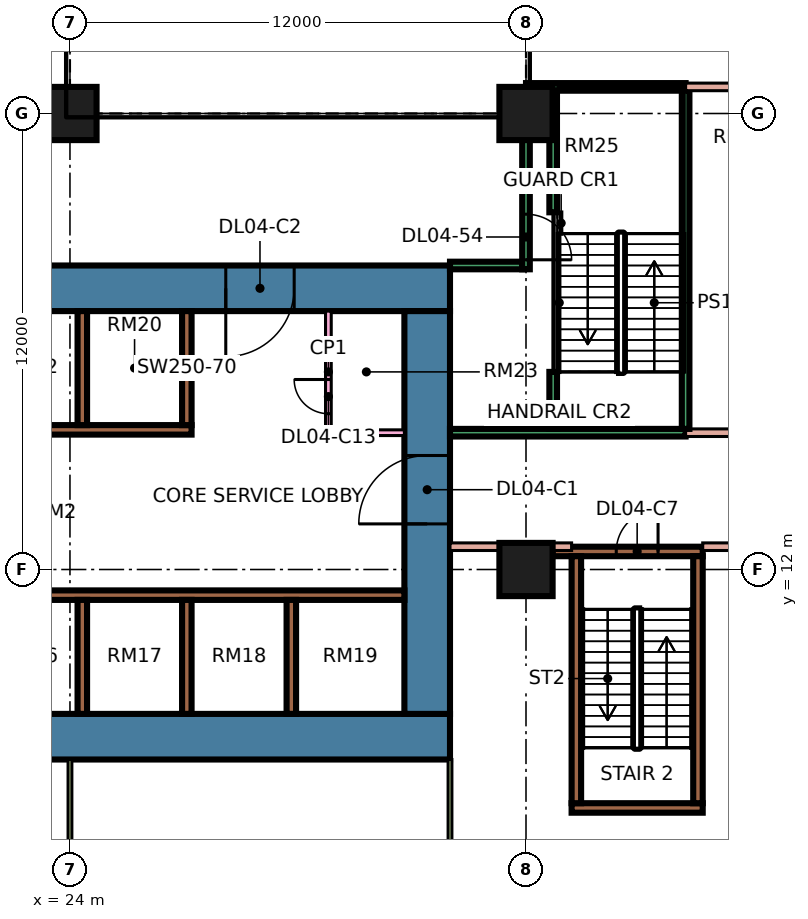
"""IFC4 building model, lengths in metres.
Left out: names, types, materials, properties, quantities, classifications, styles, units other than length and angle.
Written with IfcOpenShell. Run it as: python <this file> out.ifc"""

import sys

from ifc_helpers import new_model, si_unit, direction, frame, frame_2d, origin, origin_2d, place, context, subcontext, project, spatial, rectangle, extrude, element, fill, save


model = new_model("IFC4")
c1 = context("Model", 3, precision=1e-05, world=origin(), true_north=direction((0.0, 1.0)))
c2 = subcontext(c1, "Body", "Model", "MODEL_VIEW")
j1 = project(units=[si_unit("LENGTHUNIT", "METRE"), si_unit("PLANEANGLEUNIT", "RADIAN")], contexts=[c1])
p1 = place(None, origin())
s1 = spatial("IfcSite", under=j1, at=p1, CompositionType="ELEMENT")
p2 = place(p1, origin())
s2 = spatial("IfcBuilding", under=s1, at=p2, CompositionType="ELEMENT")
p3 = place(p2, frame((0.0, 0.0, 21.6)))
s3 = spatial("IfcBuildingStorey", under=s2, at=p3, CompositionType="ELEMENT", Elevation=21.6)
for number, where, z_axis, x_axis in (
    (1, (36.0, 12.0, 0.0), (0.0, 0.0, 1.0), (1.0, 0.0, 0.0)),
    (2, (24.0, 24.0, 0.0), (0.0, 0.0, 1.0), (1.0, 0.0, 0.0)),
    (3, (36.0, 24.0, 0.0), (0.0, 0.0, 1.0), (1.0, 0.0, 0.0)),
):
    element("IfcColumn", number, at=place(p3, frame(where, z_axis=z_axis, x_axis=x_axis)), inside=s3, PredefinedType="COLUMN", context=c2, shape_type="SweptSolid", body=[
        extrude(rectangle(XDim=1.4, YDim=1.4, at=origin_2d()), origin(), (0.0, 0.0, 1.0), 4.8),
    ])
p4 = place(p3, frame((9.0, 7.6, 0.0), z_axis=(0.0, 0.0, 1.0), x_axis=(1.0, 0.0, 0.0)))
e4 = element("IfcWall", 4, at=p4, inside=s3, PredefinedType="SHEAR", context=c2, shape_type="SweptSolid", body=[
    extrude(rectangle(XDim=25.0, YDim=1.2, at=frame_2d((12.5, 0.0))), origin(), (0.0, 0.0, 1.0), 4.8),
])
p5 = place(p3, frame((9.0, 19.4, 0.0), z_axis=(0.0, 0.0, 1.0), x_axis=(1.0, 0.0, 0.0)))
e5 = element("IfcWall", 5, at=p5, inside=s3, PredefinedType="SHEAR", context=c2, shape_type="SweptSolid", body=[
    extrude(rectangle(XDim=25.0, YDim=1.2, at=frame_2d((12.5, 0.0))), origin(), (0.0, 0.0, 1.0), 4.8),
])
p6 = place(p5, frame((19.1, 0.0, 0.0)))
e6 = element("IfcOpeningElement", 6, at=p6, cuts=e5, PredefinedType="OPENING", context=c2, shape_type="SweptSolid", body=[
    extrude(rectangle(XDim=1.8, YDim=2.4, at=frame_2d((0.9, 1.2))), frame((0.0, 0.61, 0.0), z_axis=(0.0, -1.0, 0.0), x_axis=(1.0, 0.0, 0.0)), (0.0, 0.0, 1.0), 1.22),
])
p7 = place(p3, frame((33.4, 8.2, 0.0), z_axis=(0.0, 0.0, 1.0), x_axis=(0.0, 1.0, 0.0)))
e7 = element("IfcWall", 7, at=p7, inside=s3, PredefinedType="SHEAR", context=c2, shape_type="SweptSolid", body=[
    extrude(rectangle(XDim=10.6, YDim=1.2, at=frame_2d((5.3, 0.0))), origin(), (0.0, 0.0, 1.0), 4.8),
])
p8 = place(p7, frame((5.0, 0.0, 0.0)))
e8 = element("IfcOpeningElement", 8, at=p8, cuts=e7, PredefinedType="OPENING", context=c2, shape_type="SweptSolid", body=[
    extrude(rectangle(XDim=1.8, YDim=2.4, at=frame_2d((0.9, 1.2))), frame((0.0, 0.61, 0.0), z_axis=(0.0, -1.0, 0.0), x_axis=(1.0, 0.0, 0.0)), (0.0, 0.0, 1.0), 1.22),
])
p9 = place(p3, frame((13.45, 11.325, 0.0), z_axis=(0.0, 0.0, 1.0), x_axis=(1.0, 0.0, 0.0)))
e9 = element("IfcWall", 9, at=p9, inside=s3, PredefinedType="SHEAR", context=c2, shape_type="SweptSolid", body=[
    extrude(rectangle(XDim=19.35, YDim=0.25, at=frame_2d((9.675, 0.0))), origin(), (0.0, 0.0, 1.0), 4.8),
])
p10 = place(p3, frame((13.45, 15.675, 0.0), z_axis=(0.0, 0.0, 1.0), x_axis=(1.0, 0.0, 0.0)))
e10 = element("IfcWall", 10, at=p10, inside=s3, PredefinedType="SHEAR", context=c2, shape_type="SweptSolid", body=[
    extrude(rectangle(XDim=13.75, YDim=0.25, at=frame_2d((6.875, 0.0))), origin(), (0.0, 0.0, 1.0), 4.8),
])
for number, where, z_axis, x_axis in (
    (11, (24.325, 8.2, 0.0), (0.0, 0.0, 1.0), (0.0, 1.0, 0.0)),
    (12, (27.075, 8.2, 0.0), (0.0, 0.0, 1.0), (0.0, 1.0, 0.0)),
    (13, (29.825, 8.2, 0.0), (0.0, 0.0, 1.0), (0.0, 1.0, 0.0)),
    (14, (24.325, 15.8, 0.0), (0.0, 0.0, 1.0), (0.0, 1.0, 0.0)),
    (15, (27.075, 15.8, 0.0), (0.0, 0.0, 1.0), (0.0, 1.0, 0.0)),
):
    element("IfcWall", number, at=place(p3, frame(where, z_axis=z_axis, x_axis=x_axis)), inside=s3, PredefinedType="SHEAR", context=c2, shape_type="SweptSolid", body=[
        extrude(rectangle(XDim=3.0, YDim=0.25, at=frame_2d((1.5, 0.0))), origin(), (0.0, 0.0, 1.0), 4.8),
    ])
p11 = place(p3, frame((37.2, 5.725, 0.0), z_axis=(0.0, 0.0, 1.0), x_axis=(1.0, 0.0, 0.0)))
e16 = element("IfcWall", 16, at=p11, inside=s3, PredefinedType="SHEAR", context=c2, shape_type="SweptSolid", body=[
    extrude(rectangle(XDim=3.45, YDim=0.25, at=frame_2d((1.725, 0.0))), origin(), (0.0, 0.0, 1.0), 4.8),
])
p12 = place(p3, frame((36.7, 12.475, 0.0), z_axis=(0.0, 0.0, 1.0), x_axis=(1.0, 0.0, 0.0)))
e17 = element("IfcWall", 17, at=p12, inside=s3, PredefinedType="SHEAR", context=c2, shape_type="SweptSolid", body=[
    extrude(rectangle(XDim=3.95, YDim=0.25, at=frame_2d((1.975, 0.0))), origin(), (0.0, 0.0, 1.0), 4.8),
])
p13 = place(p12, frame((1.675, 0.0, 0.0)))
e18 = element("IfcOpeningElement", 18, at=p13, cuts=e17, PredefinedType="OPENING", context=c2, shape_type="SweptSolid", body=[
    extrude(rectangle(XDim=1.1, YDim=2.2, at=frame_2d((0.55, 1.1))), frame((0.0, 0.135, 0.0), z_axis=(0.0, -1.0, 0.0), x_axis=(1.0, 0.0, 0.0)), (0.0, 0.0, 1.0), 0.27),
])
for number, where, z_axis, x_axis in (
    (19, (37.325, 5.85, 0.0), (0.0, 0.0, 1.0), (0.0, 1.0, 0.0)),
    (20, (40.525, 5.85, 0.0), (0.0, 0.0, 1.0), (0.0, 1.0, 0.0)),
):
    element("IfcWall", number, at=place(p3, frame(where, z_axis=z_axis, x_axis=x_axis)), inside=s3, PredefinedType="SHEAR", context=c2, shape_type="SweptSolid", body=[
        extrude(rectangle(XDim=6.5, YDim=0.25, at=frame_2d((3.25, 0.0))), origin(), (0.0, 0.0, 1.0), 4.8),
    ])
p14 = place(p3, frame((30.8, 15.6, 0.0), z_axis=(0.0, 0.0, 1.0), x_axis=(0.0, 1.0, 0.0)))
e21 = element("IfcWall", 21, at=p14, inside=s3, PredefinedType="PARTITIONING", context=c2, shape_type="SweptSolid", body=[
    extrude(rectangle(XDim=3.2, YDim=0.15, at=frame_2d((1.6, 0.0))), origin(), (0.0, 0.0, 1.0), 4.4),
])
p15 = place(p14, frame((0.5, 0.0, 0.0)))
e22 = element("IfcOpeningElement", 22, at=p15, cuts=e21, PredefinedType="OPENING", context=c2, shape_type="SweptSolid", body=[
    extrude(rectangle(XDim=0.9, YDim=2.1, at=frame_2d((0.45, 1.05))), frame((0.0, 0.085, 0.0), z_axis=(0.0, -1.0, 0.0), x_axis=(1.0, 0.0, 0.0)), (0.0, 0.0, 1.0), 0.17),
])
p16 = place(p3, frame((30.8, 15.6, 0.0), z_axis=(0.0, 0.0, 1.0), x_axis=(1.0, 0.0, 0.0)))
e23 = element("IfcWall", 23, at=p16, inside=s3, PredefinedType="PARTITIONING", context=c2, shape_type="SweptSolid", body=[
    extrude(rectangle(XDim=2.0, YDim=0.15, at=frame_2d((1.0, 0.0))), origin(), (0.0, 0.0, 1.0), 4.4),
])
for number, where, z_axis, x_axis in (
    (24, (24.0, -0.6, 0.0), (0.0, 0.0, 1.0), (0.0, 1.0, 0.0)),
    (25, (34.0, -0.6, 0.0), (0.0, 0.0, 1.0), (0.0, 1.0, 0.0)),
):
    element("IfcWall", number, at=place(p3, frame(where, z_axis=z_axis, x_axis=x_axis)), inside=s3, PredefinedType="PARTITIONING", context=c2, shape_type="SweptSolid", body=[
        extrude(rectangle(XDim=7.6, YDim=0.1, at=frame_2d((3.8, 0.0))), origin(), (0.0, 0.0, 1.0), 4.4),
    ])
p17 = place(p3, frame((34.0, 12.6, 0.0), z_axis=(0.0, 0.0, 1.0), x_axis=(1.0, 0.0, 0.0)))
e26 = element("IfcWall", 26, at=p17, inside=s3, PredefinedType="PARTITIONING", context=c2, shape_type="SweptSolid", body=[
    extrude(rectangle(XDim=3.2, YDim=0.2, at=frame_2d((1.6, 0.0))), origin(), (0.0, 0.0, 1.0), 4.4),
])
p18 = place(p3, frame((34.0, 15.6, 0.0), z_axis=(0.0, 0.0, 1.0), x_axis=(1.0, 0.0, 0.0)))
e27 = element("IfcWall", 27, at=p18, inside=s3, PredefinedType="SOLIDWALL", context=c2, shape_type="SweptSolid", body=[
    extrude(rectangle(XDim=6.2, YDim=0.2, at=frame_2d((3.1, 0.0))), origin(), (0.0, 0.0, 1.0), 4.4),
])
p19 = place(p3, frame((34.0, 20.0, 0.0), z_axis=(0.0, 0.0, 1.0), x_axis=(1.0, 0.0, 0.0)))
e28 = element("IfcWall", 28, at=p19, inside=s3, PredefinedType="SOLIDWALL", context=c2, shape_type="SweptSolid", body=[
    extrude(rectangle(XDim=1.9, YDim=0.2, at=frame_2d((0.95, 0.0))), origin(), (0.0, 0.0, 1.0), 4.4),
])
p20 = place(p3, frame((36.0, 19.9, 0.0), z_axis=(0.0, 0.0, 1.0), x_axis=(0.0, 1.0, 0.0)))
e29 = element("IfcWall", 29, at=p20, inside=s3, PredefinedType="SOLIDWALL", context=c2, shape_type="SweptSolid", body=[
    extrude(rectangle(XDim=4.1, YDim=0.2, at=frame_2d((2.05, 0.0))), origin(), (0.0, 0.0, 1.0), 4.4),
])
p21 = place(p20, frame((0.25, 0.0, 0.0)))
e30 = element("IfcOpeningElement", 30, at=p21, cuts=e29, PredefinedType="OPENING", context=c2, shape_type="SweptSolid", body=[
    extrude(rectangle(XDim=1.2, YDim=2.1, at=frame_2d((0.6, 1.05))), frame((0.0, 0.11, 0.0), z_axis=(0.0, -1.0, 0.0), x_axis=(1.0, 0.0, 0.0)), (0.0, 0.0, 1.0), 0.22),
])
p22 = place(p3, frame((36.0, 24.7, 0.0), z_axis=(0.0, 0.0, 1.0), x_axis=(1.0, 0.0, 0.0)))
e31 = element("IfcWall", 31, at=p22, inside=s3, PredefinedType="SOLIDWALL", context=c2, shape_type="SweptSolid", body=[
    extrude(rectangle(XDim=4.2, YDim=0.2, at=frame_2d((2.1, 0.0))), origin(), (0.0, 0.0, 1.0), 4.4),
])
p23 = place(p3, frame((40.2, 15.6, 0.0), z_axis=(0.0, 0.0, 1.0), x_axis=(1.0, 0.0, 0.0)))
e32 = element("IfcWall", 32, at=p23, inside=s3, PredefinedType="PARTITIONING", context=c2, shape_type="SweptSolid", body=[
    extrude(rectangle(XDim=4.15, YDim=0.2, at=frame_2d((2.075, 0.0))), origin(), (0.0, 0.0, 1.0), 4.4),
])
p24 = place(p3, frame((40.2, 15.7, 0.0), z_axis=(0.0, 0.0, 1.0), x_axis=(0.0, 1.0, 0.0)))
e33 = element("IfcWall", 33, at=p24, inside=s3, PredefinedType="SOLIDWALL", context=c2, shape_type="SweptSolid", body=[
    extrude(rectangle(XDim=8.9, YDim=0.2, at=frame_2d((4.45, 0.0))), origin(), (0.0, 0.0, 1.0), 4.4),
])
p25 = place(p3, frame((40.2, 24.7, 0.0), z_axis=(0.0, 0.0, 1.0), x_axis=(1.0, 0.0, 0.0)))
e34 = element("IfcWall", 34, at=p25, inside=s3, PredefinedType="PARTITIONING", context=c2, shape_type="SweptSolid", body=[
    extrude(rectangle(XDim=32.6, YDim=0.2, at=frame_2d((16.3, 0.0))), origin(), (0.0, 0.0, 1.0), 4.4),
])
p26 = place(p25, frame((2.65, 0.0, 0.0)))
e35 = element("IfcOpeningElement", 35, at=p26, cuts=e34, PredefinedType="OPENING", context=c2, shape_type="SweptSolid", body=[
    extrude(rectangle(XDim=1.0, YDim=2.1, at=frame_2d((0.5, 1.05))), frame((0.0, 0.11, 0.0), z_axis=(0.0, -1.0, 0.0), x_axis=(1.0, 0.0, 0.0)), (0.0, 0.0, 1.0), 0.22),
])
p27 = place(p25, frame((8.85, 0.0, 0.0)))
e36 = element("IfcOpeningElement", 36, at=p27, cuts=e34, PredefinedType="OPENING", context=c2, shape_type="SweptSolid", body=[
    extrude(rectangle(XDim=1.0, YDim=2.1, at=frame_2d((0.5, 1.05))), frame((0.0, 0.11, 0.0), z_axis=(0.0, -1.0, 0.0), x_axis=(1.0, 0.0, 0.0)), (0.0, 0.0, 1.0), 0.22),
])
p28 = place(p25, frame((15.05, 0.0, 0.0)))
e37 = element("IfcOpeningElement", 37, at=p28, cuts=e34, PredefinedType="OPENING", context=c2, shape_type="SweptSolid", body=[
    extrude(rectangle(XDim=1.0, YDim=2.1, at=frame_2d((0.5, 1.05))), frame((0.0, 0.11, 0.0), z_axis=(0.0, -1.0, 0.0), x_axis=(1.0, 0.0, 0.0)), (0.0, 0.0, 1.0), 0.22),
])
p29 = place(p25, frame((21.0, 0.0, 0.0)))
e38 = element("IfcOpeningElement", 38, at=p29, cuts=e34, PredefinedType="OPENING", context=c2, shape_type="SweptSolid", body=[
    extrude(rectangle(XDim=1.0, YDim=2.1, at=frame_2d((0.5, 1.05))), frame((0.0, 0.11, 0.0), z_axis=(0.0, -1.0, 0.0), x_axis=(1.0, 0.0, 0.0)), (0.0, 0.0, 1.0), 0.22),
])
p30 = place(p3, frame((40.65, 12.6, 0.0), z_axis=(0.0, 0.0, 1.0), x_axis=(1.0, 0.0, 0.0)))
e39 = element("IfcWall", 39, at=p30, inside=s3, PredefinedType="PARTITIONING", context=c2, shape_type="SweptSolid", body=[
    extrude(rectangle(XDim=4.35, YDim=0.2, at=frame_2d((2.175, 0.0))), origin(), (0.0, 0.0, 1.0), 4.4),
])
p31 = place(p30, frame((1.65, 0.0, 0.0)))
e40 = element("IfcOpeningElement", 40, at=p31, cuts=e39, PredefinedType="OPENING", context=c2, shape_type="SweptSolid", body=[
    extrude(rectangle(XDim=1.0, YDim=2.1, at=frame_2d((0.5, 1.05))), frame((0.0, 0.11, 0.0), z_axis=(0.0, -1.0, 0.0), x_axis=(1.0, 0.0, 0.0)), (0.0, 0.0, 1.0), 0.22),
])
p32 = place(p3, frame((36.715, 21.4, 0.0), z_axis=(0.0, 0.0, 1.0), x_axis=(0.0, 1.0, 0.0)))
e41 = element("IfcWall", 41, at=p32, inside=s3, PredefinedType="SOLIDWALL", context=c2, shape_type="SweptSolid", body=[
    extrude(rectangle(XDim=3.2, YDim=0.2, at=frame_2d((1.6, 0.0))), origin(), (0.0, 0.0, 1.0), 4.4),
])
p33 = place(p3, frame((36.715, 15.7, 0.0), z_axis=(0.0, 0.0, 1.0), x_axis=(0.0, 1.0, 0.0)))
e42 = element("IfcWall", 42, at=p33, inside=s3, PredefinedType="SOLIDWALL", context=c2, shape_type="SweptSolid", body=[
    extrude(rectangle(XDim=1.5, YDim=0.2, at=frame_2d((0.75, 0.0))), origin(), (0.0, 0.0, 1.0), 4.4),
])
p34 = place(p8, origin())
e43 = element("IfcDoor", 43, at=p34, inside=s3, OperationType="DOUBLE_DOOR_SINGLE_SWING", PredefinedType="DOOR", context=c2, shape_type="SweptSolid", body=[
    extrude(rectangle(XDim=1.8, YDim=2.4, at=frame_2d((0.9, 1.2))), frame((0.0, 0.025, 0.0), z_axis=(0.0, -1.0, 0.0), x_axis=(1.0, 0.0, 0.0)), (0.0, 0.0, 1.0), 0.05),
])
fill(e8, e43)
p35 = place(p6, frame((1.8, 0.0, 0.0), z_axis=(0.0, 0.0, 1.0), x_axis=(-1.0, 0.0, 0.0)))
e44 = element("IfcDoor", 44, at=p35, inside=s3, OperationType="DOUBLE_DOOR_SINGLE_SWING", PredefinedType="DOOR", context=c2, shape_type="SweptSolid", body=[
    extrude(rectangle(XDim=1.8, YDim=2.4, at=frame_2d((0.9, 1.2))), frame((0.0, 0.025, 0.0), z_axis=(0.0, -1.0, 0.0), x_axis=(1.0, 0.0, 0.0)), (0.0, 0.0, 1.0), 0.05),
])
fill(e6, e44)
p36 = place(p13, frame((1.1, 0.0, 0.0), z_axis=(0.0, 0.0, 1.0), x_axis=(-1.0, 0.0, 0.0)))
e45 = element("IfcDoor", 45, at=p36, inside=s3, OperationType="SINGLE_SWING_RIGHT", PredefinedType="DOOR", context=c2, shape_type="SweptSolid", body=[
    extrude(rectangle(XDim=1.1, YDim=2.2, at=frame_2d((0.55, 1.1))), frame((0.0, 0.025, 0.0), z_axis=(0.0, -1.0, 0.0), x_axis=(1.0, 0.0, 0.0)), (0.0, 0.0, 1.0), 0.05),
])
fill(e18, e45)
p37 = place(p15, frame((0.9, 0.0, 0.0), z_axis=(0.0, 0.0, 1.0), x_axis=(-1.0, 0.0, 0.0)))
e46 = element("IfcDoor", 46, at=p37, inside=s3, OperationType="SINGLE_SWING_RIGHT", PredefinedType="DOOR", context=c2, shape_type="SweptSolid", body=[
    extrude(rectangle(XDim=0.9, YDim=2.1, at=frame_2d((0.45, 1.05))), frame((0.0, 0.025, 0.0), z_axis=(0.0, -1.0, 0.0), x_axis=(1.0, 0.0, 0.0)), (0.0, 0.0, 1.0), 0.05),
])
fill(e22, e46)
p38 = place(p21, frame((1.2, 0.0, 0.0), z_axis=(0.0, 0.0, 1.0), x_axis=(-1.0, 0.0, 0.0)))
e47 = element("IfcDoor", 47, at=p38, inside=s3, OperationType="SINGLE_SWING_LEFT", PredefinedType="DOOR", context=c2, shape_type="SweptSolid", body=[
    extrude(rectangle(XDim=1.2, YDim=2.1, at=frame_2d((0.6, 1.05))), frame((0.0, 0.025, 0.0), z_axis=(0.0, -1.0, 0.0), x_axis=(1.0, 0.0, 0.0)), (0.0, 0.0, 1.0), 0.05),
])
fill(e30, e47)
save(model, sys.argv[1])
